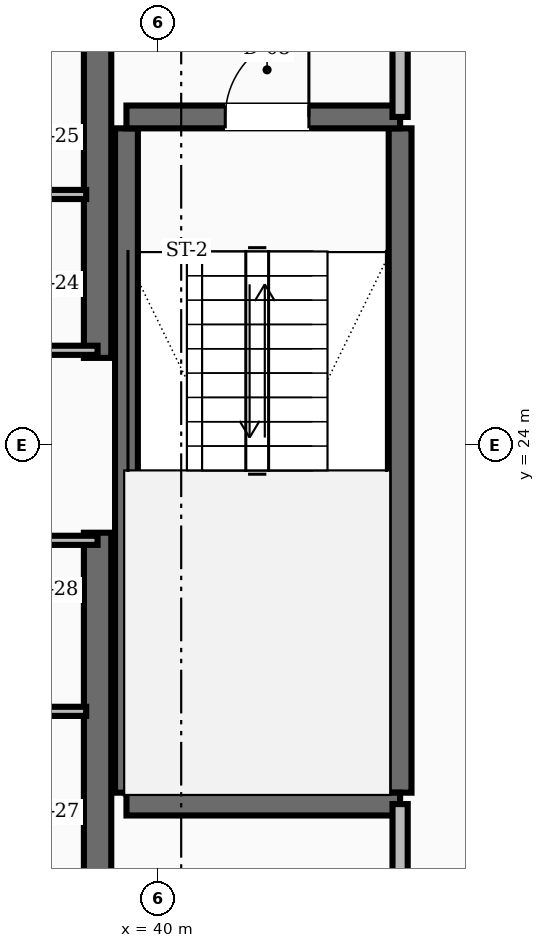
"""IFC4 building model, lengths in metres.
Left out: names, types, materials, properties, quantities, classifications, styles, units other than length and angle.
Written with IfcOpenShell. Run it as: python <this file> out.ifc"""

import sys

from ifc_helpers import new_model, si_unit, direction, frame, frame_2d, origin, place, context, subcontext, project, spatial, rectangle, extrude, element, fill, save


model = new_model("IFC4")
c1 = context("Model", 3, precision=1e-05, world=origin(), true_north=direction((0.0, 1.0)))
c2 = subcontext(c1, "Body", "Model", "MODEL_VIEW")
j1 = project(units=[si_unit("LENGTHUNIT", "METRE"), si_unit("PLANEANGLEUNIT", "RADIAN")], contexts=[c1])
p1 = place(None, origin())
s1 = spatial("IfcSite", under=j1, at=p1, CompositionType="ELEMENT")
p2 = place(p1, origin())
s2 = spatial("IfcBuilding", under=s1, at=p2, CompositionType="ELEMENT")
p3 = place(p2, frame((0.0, 0.0, 146.0)))
s3 = spatial("IfcBuildingStorey", under=s2, at=p3, CompositionType="ELEMENT", Elevation=146.0)
for number, where, z_axis, x_axis in (
    (1, (39.2, 16.55, 0.0), (0.0, 0.0, 1.0), (0.0, 1.0, 0.0)),
    (2, (39.2, 25.15, 0.0), (0.0, 0.0, 1.0), (0.0, 1.0, 0.0)),
):
    element("IfcWall", number, at=place(p3, frame(where, z_axis=z_axis, x_axis=x_axis)), inside=s3, PredefinedType="SHEAR", context=c2, shape_type="SweptSolid", body=[
        extrude(rectangle(XDim=6.3, YDim=0.36, at=frame_2d((3.15, 0.0))), origin(), (0.0, 0.0, 1.0), 3.6),
    ])
for number, where, z_axis, x_axis in (
    (3, (43.18, 19.43, 0.0), (0.0, 0.0, 1.0), (0.0, 1.0, 0.0)),
    (4, (39.58, 19.43, 0.0), (0.0, 0.0, 1.0), (0.0, 1.0, 0.0)),
):
    element("IfcWall", number, at=place(p3, frame(where, z_axis=z_axis, x_axis=x_axis)), inside=s3, PredefinedType="SHEAR", context=c2, shape_type="SweptSolid", body=[
        extrude(rectangle(XDim=8.74, YDim=0.3, at=frame_2d((4.37, 0.0))), origin(), (0.0, 0.0, 1.0), 3.6),
    ])
p4 = place(p3, frame((39.58, 19.28, 0.0), z_axis=(0.0, 0.0, 1.0), x_axis=(1.0, 0.0, 0.0)))
e5 = element("IfcWall", 5, at=p4, inside=s3, PredefinedType="SHEAR", context=c2, shape_type="SweptSolid", body=[
    extrude(rectangle(XDim=3.6, YDim=0.3, at=frame_2d((1.8, 0.0))), origin(), (0.0, 0.0, 1.0), 3.6),
])
p5 = place(p3, frame((39.58, 28.32, 0.0), z_axis=(0.0, 0.0, 1.0), x_axis=(1.0, 0.0, 0.0)))
e6 = element("IfcWall", 6, at=p5, inside=s3, PredefinedType="SHEAR", context=c2, shape_type="SweptSolid", body=[
    extrude(rectangle(XDim=3.6, YDim=0.3, at=frame_2d((1.8, 0.0))), origin(), (0.0, 0.0, 1.0), 3.6),
])
p6 = place(p5, frame((1.3, 0.0, 0.0)))
e7 = element("IfcOpeningElement", 7, at=p6, cuts=e6, PredefinedType="OPENING", context=c2, shape_type="SweptSolid", body=[
    extrude(rectangle(XDim=1.1, YDim=2.1, at=frame_2d((0.55, 1.05))), frame((0.0, 0.16, 0.0), z_axis=(0.0, -1.0, 0.0), x_axis=(1.0, 0.0, 0.0)), (0.0, 0.0, 1.0), 0.32),
])
p7 = place(p3, frame((43.18, 28.32, 0.0), z_axis=(0.0, 0.0, 1.0), x_axis=(0.0, 1.0, 0.0)))
e8 = element("IfcWall", 8, at=p7, inside=s3, PredefinedType="SOLIDWALL", context=c2, shape_type="SweptSolid", body=[
    extrude(rectangle(XDim=3.13, YDim=0.2, at=frame_2d((1.565, 0.0))), origin(), (0.0, 0.0, 1.0), 2.8),
])
p8 = place(p7, frame((1.015, 0.0, 0.0)))
e9 = element("IfcOpeningElement", 9, at=p8, cuts=e8, PredefinedType="OPENING", context=c2, shape_type="SweptSolid", body=[
    extrude(rectangle(XDim=1.1, YDim=2.1, at=frame_2d((0.55, 1.05))), frame((0.0, 0.11, 0.0), z_axis=(0.0, -1.0, 0.0), x_axis=(1.0, 0.0, 0.0)), (0.0, 0.0, 1.0), 0.22),
])
p9 = place(p3, frame((43.18, 16.55, 0.0), z_axis=(0.0, 0.0, 1.0), x_axis=(0.0, 1.0, 0.0)))
e10 = element("IfcWall", 10, at=p9, inside=s3, PredefinedType="SOLIDWALL", context=c2, shape_type="SweptSolid", body=[
    extrude(rectangle(XDim=2.73, YDim=0.2, at=frame_2d((1.365, 0.0))), origin(), (0.0, 0.0, 1.0), 2.8),
])
p10 = place(p9, frame((0.89, 0.0, 0.0)))
e11 = element("IfcOpeningElement", 11, at=p10, cuts=e10, PredefinedType="OPENING", context=c2, shape_type="SweptSolid", body=[
    extrude(rectangle(XDim=0.95, YDim=2.1, at=frame_2d((0.475, 1.05))), frame((0.0, 0.11, 0.0), z_axis=(0.0, -1.0, 0.0), x_axis=(1.0, 0.0, 0.0)), (0.0, 0.0, 1.0), 0.22),
])
for number, where, z_axis, x_axis in (
    (12, (37.4, 25.25, 0.0), (0.0, 0.0, 1.0), (1.0, 0.0, 0.0)),
    (13, (37.4, 22.75, 0.0), (0.0, 0.0, 1.0), (1.0, 0.0, 0.0)),
):
    element("IfcWall", number, at=place(p3, frame(where, z_axis=z_axis, x_axis=x_axis)), inside=s3, PredefinedType="PARTITIONING", context=c2, shape_type="SweptSolid", body=[
        extrude(rectangle(XDim=1.8, YDim=0.12, at=frame_2d((0.9, 0.0))), origin(), (0.0, 0.0, 1.0), 2.8),
    ])
for number, where, z_axis, x_axis in (
    (14, (37.4, 27.3, 0.0), (0.0, 0.0, 1.0), (1.0, 0.0, 0.0)),
    (15, (37.4, 20.5, 0.0), (0.0, 0.0, 1.0), (1.0, 0.0, 0.0)),
):
    element("IfcWall", number, at=place(p3, frame(where, z_axis=z_axis, x_axis=x_axis)), inside=s3, PredefinedType="PARTITIONING", context=c2, shape_type="SweptSolid", body=[
        extrude(rectangle(XDim=1.65, YDim=0.12, at=frame_2d((0.825, 0.0))), origin(), (0.0, 0.0, 1.0), 2.8),
    ])
p11 = place(p6, origin())
e16 = element("IfcDoor", 16, at=p11, inside=s3, OperationType="SINGLE_SWING_RIGHT", PredefinedType="DOOR", context=c2, shape_type="SweptSolid", body=[
    extrude(rectangle(XDim=1.1, YDim=2.1, at=frame_2d((0.55, 1.05))), frame((0.0, 0.025, 0.0), z_axis=(0.0, -1.0, 0.0), x_axis=(1.0, 0.0, 0.0)), (0.0, 0.0, 1.0), 0.05),
])
fill(e7, e16)
save(model, sys.argv[1])
